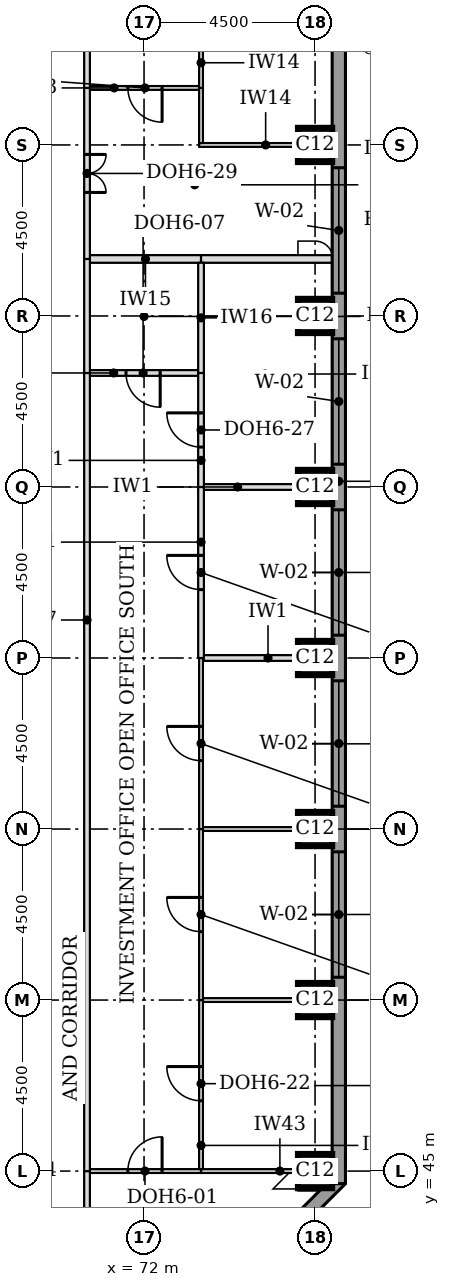
"""IFC4 building model, lengths in metres.
Left out: names, types, materials, properties, quantities, classifications, styles, units other than length and angle.
Written with IfcOpenShell. Run it as: python <this file> out.ifc"""

import sys

from ifc_helpers import new_model, si_unit, direction, frame, frame_2d, origin, origin_2d, place, context, subcontext, project, spatial, rectangle, extrude, element, fill, save


model = new_model("IFC4")
c1 = context("Model", 3, precision=1e-05, world=origin(), true_north=direction((0.0, 1.0)))
c2 = subcontext(c1, "Body", "Model", "MODEL_VIEW")
j1 = project(units=[si_unit("LENGTHUNIT", "METRE"), si_unit("PLANEANGLEUNIT", "RADIAN")], contexts=[c1])
p1 = place(None, origin())
s1 = spatial("IfcSite", under=j1, at=p1, CompositionType="ELEMENT")
p2 = place(p1, origin())
s2 = spatial("IfcBuilding", under=s1, at=p2, CompositionType="ELEMENT")
p3 = place(p2, frame((0.0, 0.0, 188.4)))
s3 = spatial("IfcBuildingStorey", under=s2, at=p3, CompositionType="ELEMENT", Elevation=188.4)
for number, where, z_axis, x_axis in (
    (1, (76.5, 45.0, 0.0), (0.0, 0.0, 1.0), (1.0, 0.0, 0.0)),
    (2, (76.5, 49.5, 0.0), (0.0, 0.0, 1.0), (1.0, 0.0, 0.0)),
    (3, (76.5, 54.0, 0.0), (0.0, 0.0, 1.0), (1.0, 0.0, 0.0)),
    (4, (76.5, 58.5, 0.0), (0.0, 0.0, 1.0), (1.0, 0.0, 0.0)),
    (5, (76.5, 63.0, 0.0), (0.0, 0.0, 1.0), (1.0, 0.0, 0.0)),
    (6, (76.5, 67.5, 0.0), (0.0, 0.0, 1.0), (1.0, 0.0, 0.0)),
    (7, (76.5, 72.0, 0.0), (0.0, 0.0, 1.0), (1.0, 0.0, 0.0)),
):
    element("IfcColumn", number, at=place(p3, frame(where, z_axis=z_axis, x_axis=x_axis)), inside=s3, PredefinedType="COLUMN", context=c2, shape_type="SweptSolid", body=[
        extrude(rectangle(XDim=0.9, YDim=0.9, at=origin_2d()), origin(), (0.0, 0.0, 1.0), 3.7),
    ])
p4 = place(p3, frame((72.208, 39.824, 0.0), z_axis=(0.0, 0.0, 1.0), x_axis=(0.707106781187, 0.707106781187, 0.0)))
e8 = element("IfcWall", 8, at=p4, inside=s3, PredefinedType="STANDARD", context=c2, shape_type="SweptSolid", body=[
    extrude(rectangle(XDim=7.027, YDim=0.35, at=frame_2d((3.513, 0.0))), origin(), (0.0, 0.0, 1.0), 3.525),
])
p5 = place(p4, frame((1.863, 0.0, 0.9)))
e9 = element("IfcOpeningElement", 9, at=p5, cuts=e8, PredefinedType="OPENING", context=c2, shape_type="SweptSolid", body=[
    extrude(rectangle(XDim=3.3, YDim=1.9, at=frame_2d((1.65, 0.95))), frame((0.0, 0.185, 0.0), z_axis=(0.0, -1.0, 0.0), x_axis=(1.0, 0.0, 0.0)), (0.0, 0.0, 1.0), 0.37),
])
p6 = place(p3, frame((77.125, 44.669, 0.0), z_axis=(0.0, 0.0, 1.0), x_axis=(0.0, 1.0, 0.0)))
e10 = element("IfcWall", 10, at=p6, inside=s3, PredefinedType="STANDARD", context=c2, shape_type="SweptSolid", body=[
    extrude(rectangle(XDim=32.163, YDim=0.35, at=frame_2d((16.081, 0.0))), origin(), (0.0, 0.0, 1.0), 3.525),
])
p7 = place(p6, frame((5.431, 0.0, 0.9)))
e11 = element("IfcOpeningElement", 11, at=p7, cuts=e10, PredefinedType="OPENING", context=c2, shape_type="SweptSolid", body=[
    extrude(rectangle(XDim=3.3, YDim=1.9, at=frame_2d((1.65, 0.95))), frame((0.0, 0.185, 0.0), z_axis=(0.0, -1.0, 0.0), x_axis=(1.0, 0.0, 0.0)), (0.0, 0.0, 1.0), 0.37),
])
p8 = place(p6, frame((9.931, 0.0, 0.9)))
e12 = element("IfcOpeningElement", 12, at=p8, cuts=e10, PredefinedType="OPENING", context=c2, shape_type="SweptSolid", body=[
    extrude(rectangle(XDim=3.3, YDim=1.9, at=frame_2d((1.65, 0.95))), frame((0.0, 0.185, 0.0), z_axis=(0.0, -1.0, 0.0), x_axis=(1.0, 0.0, 0.0)), (0.0, 0.0, 1.0), 0.37),
])
p9 = place(p6, frame((14.431, 0.0, 0.9)))
e13 = element("IfcOpeningElement", 13, at=p9, cuts=e10, PredefinedType="OPENING", context=c2, shape_type="SweptSolid", body=[
    extrude(rectangle(XDim=3.3, YDim=1.9, at=frame_2d((1.65, 0.95))), frame((0.0, 0.185, 0.0), z_axis=(0.0, -1.0, 0.0), x_axis=(1.0, 0.0, 0.0)), (0.0, 0.0, 1.0), 0.37),
])
p10 = place(p6, frame((18.931, 0.0, 0.9)))
e14 = element("IfcOpeningElement", 14, at=p10, cuts=e10, PredefinedType="OPENING", context=c2, shape_type="SweptSolid", body=[
    extrude(rectangle(XDim=3.3, YDim=1.9, at=frame_2d((1.65, 0.95))), frame((0.0, 0.185, 0.0), z_axis=(0.0, -1.0, 0.0), x_axis=(1.0, 0.0, 0.0)), (0.0, 0.0, 1.0), 0.37),
])
p11 = place(p6, frame((23.431, 0.0, 0.9)))
e15 = element("IfcOpeningElement", 15, at=p11, cuts=e10, PredefinedType="OPENING", context=c2, shape_type="SweptSolid", body=[
    extrude(rectangle(XDim=3.3, YDim=1.9, at=frame_2d((1.65, 0.95))), frame((0.0, 0.185, 0.0), z_axis=(0.0, -1.0, 0.0), x_axis=(1.0, 0.0, 0.0)), (0.0, 0.0, 1.0), 0.37),
])
p12 = place(p3, frame((70.575, 45.0, 0.0), z_axis=(0.0, 0.0, 1.0), x_axis=(1.0, 0.0, 0.0)))
e16 = element("IfcWall", 16, at=p12, inside=s3, PredefinedType="PARTITIONING", context=c2, shape_type="SweptSolid", body=[
    extrude(rectangle(XDim=2.925, YDim=0.1, at=frame_2d((1.462, 0.0))), origin(), (0.0, 0.0, 1.0), 3.096),
])
p13 = place(p12, frame((1.0, 0.0, 0.0)))
e17 = element("IfcOpeningElement", 17, at=p13, cuts=e16, PredefinedType="OPENING", context=c2, shape_type="SweptSolid", body=[
    extrude(rectangle(XDim=0.9, YDim=2.1, at=frame_2d((0.45, 1.05))), frame((0.0, 0.06, 0.0), z_axis=(0.0, -1.0, 0.0), x_axis=(1.0, 0.0, 0.0)), (0.0, 0.0, 1.0), 0.12),
])
p14 = place(p3, frame((73.5, 45.0, 0.0), z_axis=(0.0, 0.0, 1.0), x_axis=(1.0, 0.0, 0.0)))
e18 = element("IfcWall", 18, at=p14, inside=s3, PredefinedType="PARTITIONING", context=c2, shape_type="SweptSolid", body=[
    extrude(rectangle(XDim=2.55, YDim=0.1, at=frame_2d((1.275, 0.0))), origin(), (0.0, 0.0, 1.0), 3.096),
])
for number, where, z_axis, x_axis in (
    (19, (73.55, 49.5, 0.0), (0.0, 0.0, 1.0), (1.0, 0.0, 0.0)),
    (20, (73.55, 54.0, 0.0), (0.0, 0.0, 1.0), (1.0, 0.0, 0.0)),
):
    element("IfcWall", number, at=place(p3, frame(where, z_axis=z_axis, x_axis=x_axis)), inside=s3, PredefinedType="PARTITIONING", context=c2, shape_type="SweptSolid", body=[
        extrude(rectangle(XDim=3.4, YDim=0.1, at=frame_2d((1.7, 0.0))), origin(), (0.0, 0.0, 1.0), 3.55),
    ])
for number, where, z_axis, x_axis in (
    (21, (73.575, 58.5, 0.0), (0.0, 0.0, 1.0), (1.0, 0.0, 0.0)),
    (22, (73.575, 63.0, 0.0), (0.0, 0.0, 1.0), (1.0, 0.0, 0.0)),
):
    element("IfcWall", number, at=place(p3, frame(where, z_axis=z_axis, x_axis=x_axis)), inside=s3, PredefinedType="PARTITIONING", context=c2, shape_type="SweptSolid", body=[
        extrude(rectangle(XDim=3.375, YDim=0.15, at=frame_2d((1.688, 0.0))), origin(), (0.0, 0.0, 1.0), 3.55),
    ])
p15 = place(p3, frame((70.575, 66.0, 0.0), z_axis=(0.0, 0.0, 1.0), x_axis=(1.0, 0.0, 0.0)))
e23 = element("IfcWall", 23, at=p15, inside=s3, PredefinedType="PARTITIONING", context=c2, shape_type="SweptSolid", body=[
    extrude(rectangle(XDim=2.85, YDim=0.15, at=frame_2d((1.425, 0.0))), origin(), (0.0, 0.0, 1.0), 3.55),
])
p16 = place(p15, frame((0.95, 0.0, 0.0)))
e24 = element("IfcOpeningElement", 24, at=p16, cuts=e23, PredefinedType="OPENING", context=c2, shape_type="SweptSolid", body=[
    extrude(rectangle(XDim=0.9, YDim=2.1, at=frame_2d((0.45, 1.05))), frame((0.0, 0.085, 0.0), z_axis=(0.0, -1.0, 0.0), x_axis=(1.0, 0.0, 0.0)), (0.0, 0.0, 1.0), 0.17),
])
p17 = place(p3, frame((70.575, 69.0, 0.0), z_axis=(0.0, 0.0, 1.0), x_axis=(1.0, 0.0, 0.0)))
e25 = element("IfcWall", 25, at=p17, inside=s3, PredefinedType="PARTITIONING", context=c2, shape_type="SweptSolid", body=[
    extrude(rectangle(XDim=2.925, YDim=0.2, at=frame_2d((1.462, 0.0))), origin(), (0.0, 0.0, 1.0), 3.55),
])
p18 = place(p3, frame((73.5, 69.0, 0.0), z_axis=(0.0, 0.0, 1.0), x_axis=(1.0, 0.0, 0.0)))
e26 = element("IfcWall", 26, at=p18, inside=s3, PredefinedType="PARTITIONING", context=c2, shape_type="SweptSolid", body=[
    extrude(rectangle(XDim=3.45, YDim=0.2, at=frame_2d((1.725, 0.0))), origin(), (0.0, 0.0, 1.0), 3.55),
])
p19 = place(p3, frame((73.45, 72.0, 0.0), z_axis=(0.0, 0.0, 1.0), x_axis=(1.0, 0.0, 0.0)))
e27 = element("IfcWall", 27, at=p19, inside=s3, PredefinedType="PARTITIONING", context=c2, shape_type="SweptSolid", body=[
    extrude(rectangle(XDim=3.5, YDim=0.1, at=frame_2d((1.75, 0.0))), origin(), (0.0, 0.0, 1.0), 3.55),
])
p20 = place(p3, frame((70.575, 73.5, 0.0), z_axis=(0.0, 0.0, 1.0), x_axis=(1.0, 0.0, 0.0)))
e28 = element("IfcWall", 28, at=p20, inside=s3, PredefinedType="PARTITIONING", context=c2, shape_type="SweptSolid", body=[
    extrude(rectangle(XDim=2.875, YDim=0.1, at=frame_2d((1.438, 0.0))), origin(), (0.0, 0.0, 1.0), 3.096),
])
p21 = place(p20, frame((1.0, 0.0, 0.0)))
e29 = element("IfcOpeningElement", 29, at=p21, cuts=e28, PredefinedType="OPENING", context=c2, shape_type="SweptSolid", body=[
    extrude(rectangle(XDim=0.9, YDim=2.1, at=frame_2d((0.45, 1.05))), frame((0.0, 0.06, 0.0), z_axis=(0.0, -1.0, 0.0), x_axis=(1.0, 0.0, 0.0)), (0.0, 0.0, 1.0), 0.12),
])
p22 = place(p3, frame((70.5, 40.05, 0.0), z_axis=(0.0, 0.0, 1.0), x_axis=(0.0, 1.0, 0.0)))
e30 = element("IfcWall", 30, at=p22, inside=s3, PredefinedType="PARTITIONING", context=c2, shape_type="SweptSolid", body=[
    extrude(rectangle(XDim=4.95, YDim=0.15, at=frame_2d((2.475, 0.0))), origin(), (0.0, 0.0, 1.0), 3.55),
])
p23 = place(p22, frame((2.0, 0.0, 0.0)))
e31 = element("IfcOpeningElement", 31, at=p23, cuts=e30, PredefinedType="OPENING", context=c2, shape_type="SweptSolid", body=[
    extrude(rectangle(XDim=1.0, YDim=2.1, at=frame_2d((0.5, 1.05))), frame((0.0, 0.085, 0.0), z_axis=(0.0, -1.0, 0.0), x_axis=(1.0, 0.0, 0.0)), (0.0, 0.0, 1.0), 0.17),
])
p24 = place(p3, frame((70.5, 45.0, 0.0), z_axis=(0.0, 0.0, 1.0), x_axis=(0.0, 1.0, 0.0)))
e32 = element("IfcWall", 32, at=p24, inside=s3, PredefinedType="PARTITIONING", context=c2, shape_type="SweptSolid", body=[
    extrude(rectangle(XDim=21.0, YDim=0.15, at=frame_2d((10.5, 0.0))), origin(), (0.0, 0.0, 1.0), 3.55),
])
p25 = place(p3, frame((73.5, 45.05, 0.0), z_axis=(0.0, 0.0, 1.0), x_axis=(0.0, 1.0, 0.0)))
e33 = element("IfcWall", 33, at=p25, inside=s3, PredefinedType="PARTITIONING", context=c2, shape_type="SweptSolid", body=[
    extrude(rectangle(XDim=4.45, YDim=0.1, at=frame_2d((2.225, 0.0))), origin(), (0.0, 0.0, 1.0), 3.55),
])
p26 = place(p25, frame((1.8, 0.0, 0.0)))
e34 = element("IfcOpeningElement", 34, at=p26, cuts=e33, PredefinedType="OPENING", context=c2, shape_type="SweptSolid", body=[
    extrude(rectangle(XDim=0.9, YDim=2.1, at=frame_2d((0.45, 1.05))), frame((0.0, 0.06, 0.0), z_axis=(0.0, -1.0, 0.0), x_axis=(1.0, 0.0, 0.0)), (0.0, 0.0, 1.0), 0.12),
])
p27 = place(p3, frame((73.5, 49.5, 0.0), z_axis=(0.0, 0.0, 1.0), x_axis=(0.0, 1.0, 0.0)))
e35 = element("IfcWall", 35, at=p27, inside=s3, PredefinedType="PARTITIONING", context=c2, shape_type="SweptSolid", body=[
    extrude(rectangle(XDim=4.5, YDim=0.1, at=frame_2d((2.25, 0.0))), origin(), (0.0, 0.0, 1.0), 3.55),
])
p28 = place(p27, frame((1.8, 0.0, 0.0)))
e36 = element("IfcOpeningElement", 36, at=p28, cuts=e35, PredefinedType="OPENING", context=c2, shape_type="SweptSolid", body=[
    extrude(rectangle(XDim=0.9, YDim=2.1, at=frame_2d((0.45, 1.05))), frame((0.0, 0.06, 0.0), z_axis=(0.0, -1.0, 0.0), x_axis=(1.0, 0.0, 0.0)), (0.0, 0.0, 1.0), 0.12),
])
p29 = place(p3, frame((73.5, 54.0, 0.0), z_axis=(0.0, 0.0, 1.0), x_axis=(0.0, 1.0, 0.0)))
e37 = element("IfcWall", 37, at=p29, inside=s3, PredefinedType="PARTITIONING", context=c2, shape_type="SweptSolid", body=[
    extrude(rectangle(XDim=4.5, YDim=0.1, at=frame_2d((2.25, 0.0))), origin(), (0.0, 0.0, 1.0), 3.55),
])
p30 = place(p29, frame((1.8, 0.0, 0.0)))
e38 = element("IfcOpeningElement", 38, at=p30, cuts=e37, PredefinedType="OPENING", context=c2, shape_type="SweptSolid", body=[
    extrude(rectangle(XDim=0.9, YDim=2.1, at=frame_2d((0.45, 1.05))), frame((0.0, 0.06, 0.0), z_axis=(0.0, -1.0, 0.0), x_axis=(1.0, 0.0, 0.0)), (0.0, 0.0, 1.0), 0.12),
])
p31 = place(p3, frame((73.5, 58.5, 0.0), z_axis=(0.0, 0.0, 1.0), x_axis=(0.0, 1.0, 0.0)))
e39 = element("IfcWall", 39, at=p31, inside=s3, PredefinedType="PARTITIONING", context=c2, shape_type="SweptSolid", body=[
    extrude(rectangle(XDim=4.5, YDim=0.15, at=frame_2d((2.25, 0.0))), origin(), (0.0, 0.0, 1.0), 3.55),
])
p32 = place(p31, frame((1.8, 0.0, 0.0)))
e40 = element("IfcOpeningElement", 40, at=p32, cuts=e39, PredefinedType="OPENING", context=c2, shape_type="SweptSolid", body=[
    extrude(rectangle(XDim=0.9, YDim=2.1, at=frame_2d((0.45, 1.05))), frame((0.0, 0.085, 0.0), z_axis=(0.0, -1.0, 0.0), x_axis=(1.0, 0.0, 0.0)), (0.0, 0.0, 1.0), 0.17),
])
p33 = place(p3, frame((73.5, 63.0, 0.0), z_axis=(0.0, 0.0, 1.0), x_axis=(0.0, 1.0, 0.0)))
e41 = element("IfcWall", 41, at=p33, inside=s3, PredefinedType="PARTITIONING", context=c2, shape_type="SweptSolid", body=[
    extrude(rectangle(XDim=3.0, YDim=0.15, at=frame_2d((1.5, 0.0))), origin(), (0.0, 0.0, 1.0), 3.55),
])
p34 = place(p33, frame((1.05, 0.0, 0.0)))
e42 = element("IfcOpeningElement", 42, at=p34, cuts=e41, PredefinedType="OPENING", context=c2, shape_type="SweptSolid", body=[
    extrude(rectangle(XDim=0.9, YDim=2.1, at=frame_2d((0.45, 1.05))), frame((0.0, 0.085, 0.0), z_axis=(0.0, -1.0, 0.0), x_axis=(1.0, 0.0, 0.0)), (0.0, 0.0, 1.0), 0.17),
])
p35 = place(p3, frame((70.5, 66.0, 0.0), z_axis=(0.0, 0.0, 1.0), x_axis=(0.0, 1.0, 0.0)))
e43 = element("IfcWall", 43, at=p35, inside=s3, PredefinedType="PARTITIONING", context=c2, shape_type="SweptSolid", body=[
    extrude(rectangle(XDim=3.0, YDim=0.15, at=frame_2d((1.5, 0.0))), origin(), (0.0, 0.0, 1.0), 3.55),
])
p36 = place(p3, frame((73.5, 66.0, 0.0), z_axis=(0.0, 0.0, 1.0), x_axis=(0.0, 1.0, 0.0)))
e44 = element("IfcWall", 44, at=p36, inside=s3, PredefinedType="PARTITIONING", context=c2, shape_type="SweptSolid", body=[
    extrude(rectangle(XDim=2.9, YDim=0.15, at=frame_2d((1.45, 0.0))), origin(), (0.0, 0.0, 1.0), 3.55),
])
p37 = place(p3, frame((70.5, 69.0, 0.0), z_axis=(0.0, 0.0, 1.0), x_axis=(0.0, 1.0, 0.0)))
e45 = element("IfcWall", 45, at=p37, inside=s3, PredefinedType="PARTITIONING", context=c2, shape_type="SweptSolid", body=[
    extrude(rectangle(XDim=4.5, YDim=0.15, at=frame_2d((2.25, 0.0))), origin(), (0.0, 0.0, 1.0), 3.55),
])
p38 = place(p37, frame((1.75, 0.0, 0.0)))
e46 = element("IfcOpeningElement", 46, at=p38, cuts=e45, PredefinedType="OPENING", context=c2, shape_type="SweptSolid", body=[
    extrude(rectangle(XDim=1.0, YDim=2.1, at=frame_2d((0.5, 1.05))), frame((0.0, 0.085, 0.0), z_axis=(0.0, -1.0, 0.0), x_axis=(1.0, 0.0, 0.0)), (0.0, 0.0, 1.0), 0.17),
])
p39 = place(p3, frame((73.5, 72.05, 0.0), z_axis=(0.0, 0.0, 1.0), x_axis=(0.0, 1.0, 0.0)))
e47 = element("IfcWall", 47, at=p39, inside=s3, PredefinedType="PARTITIONING", context=c2, shape_type="SweptSolid", body=[
    extrude(rectangle(XDim=1.45, YDim=0.1, at=frame_2d((0.725, 0.0))), origin(), (0.0, 0.0, 1.0), 3.55),
])
p40 = place(p3, frame((70.5, 73.5, 0.0), z_axis=(0.0, 0.0, 1.0), x_axis=(0.0, 1.0, 0.0)))
e48 = element("IfcWall", 48, at=p40, inside=s3, PredefinedType="PARTITIONING", context=c2, shape_type="SweptSolid", body=[
    extrude(rectangle(XDim=3.0, YDim=0.15, at=frame_2d((1.5, 0.0))), origin(), (0.0, 0.0, 1.0), 3.55),
])
p41 = place(p3, frame((73.5, 73.5, 0.0), z_axis=(0.0, 0.0, 1.0), x_axis=(0.0, 1.0, 0.0)))
e49 = element("IfcWall", 49, at=p41, inside=s3, PredefinedType="PARTITIONING", context=c2, shape_type="SweptSolid", body=[
    extrude(rectangle(XDim=2.925, YDim=0.1, at=frame_2d((1.462, 0.0))), origin(), (0.0, 0.0, 1.0), 3.55),
])
p42 = place(p41, frame((1.0, 0.0, 0.0)))
e50 = element("IfcOpeningElement", 50, at=p42, cuts=e49, PredefinedType="OPENING", context=c2, shape_type="SweptSolid", body=[
    extrude(rectangle(XDim=0.9, YDim=2.1, at=frame_2d((0.45, 1.05))), frame((0.0, 0.06, 0.0), z_axis=(0.0, -1.0, 0.0), x_axis=(1.0, 0.0, 0.0)), (0.0, 0.0, 1.0), 0.12),
])
p43 = place(p7, origin())
e51 = element("IfcWindow", 51, at=p43, inside=s3, PartitioningType="SINGLE_PANEL", PredefinedType="WINDOW", context=c2, shape_type="SweptSolid", body=[
    extrude(rectangle(XDim=3.3, YDim=1.9, at=frame_2d((1.65, 0.95))), frame((0.0, 0.085, 0.0), z_axis=(0.0, -1.0, 0.0), x_axis=(1.0, 0.0, 0.0)), (0.0, 0.0, 1.0), 0.06),
])
fill(e11, e51)
p44 = place(p8, origin())
e52 = element("IfcWindow", 52, at=p44, inside=s3, PartitioningType="SINGLE_PANEL", PredefinedType="WINDOW", context=c2, shape_type="SweptSolid", body=[
    extrude(rectangle(XDim=3.3, YDim=1.9, at=frame_2d((1.65, 0.95))), frame((0.0, 0.085, 0.0), z_axis=(0.0, -1.0, 0.0), x_axis=(1.0, 0.0, 0.0)), (0.0, 0.0, 1.0), 0.06),
])
fill(e12, e52)
p45 = place(p9, origin())
e53 = element("IfcWindow", 53, at=p45, inside=s3, PartitioningType="SINGLE_PANEL", PredefinedType="WINDOW", context=c2, shape_type="SweptSolid", body=[
    extrude(rectangle(XDim=3.3, YDim=1.9, at=frame_2d((1.65, 0.95))), frame((0.0, 0.085, 0.0), z_axis=(0.0, -1.0, 0.0), x_axis=(1.0, 0.0, 0.0)), (0.0, 0.0, 1.0), 0.06),
])
fill(e13, e53)
p46 = place(p10, origin())
e54 = element("IfcWindow", 54, at=p46, inside=s3, PartitioningType="SINGLE_PANEL", PredefinedType="WINDOW", context=c2, shape_type="SweptSolid", body=[
    extrude(rectangle(XDim=3.3, YDim=1.9, at=frame_2d((1.65, 0.95))), frame((0.0, 0.085, 0.0), z_axis=(0.0, -1.0, 0.0), x_axis=(1.0, 0.0, 0.0)), (0.0, 0.0, 1.0), 0.06),
])
fill(e14, e54)
p47 = place(p11, origin())
e55 = element("IfcWindow", 55, at=p47, inside=s3, PartitioningType="SINGLE_PANEL", PredefinedType="WINDOW", context=c2, shape_type="SweptSolid", body=[
    extrude(rectangle(XDim=3.3, YDim=1.9, at=frame_2d((1.65, 0.95))), frame((0.0, 0.085, 0.0), z_axis=(0.0, -1.0, 0.0), x_axis=(1.0, 0.0, 0.0)), (0.0, 0.0, 1.0), 0.06),
])
fill(e15, e55)
p48 = place(p13, origin())
e56 = element("IfcDoor", 56, at=p48, inside=s3, OperationType="SINGLE_SWING_RIGHT", PredefinedType="DOOR", context=c2, shape_type="SweptSolid", body=[
    extrude(rectangle(XDim=0.9, YDim=2.1, at=frame_2d((0.45, 1.05))), frame((0.0, 0.025, 0.0), z_axis=(0.0, -1.0, 0.0), x_axis=(1.0, 0.0, 0.0)), (0.0, 0.0, 1.0), 0.05),
])
fill(e17, e56)
p49 = place(p26, origin())
e57 = element("IfcDoor", 57, at=p49, inside=s3, OperationType="SINGLE_SWING_RIGHT", PredefinedType="DOOR", context=c2, shape_type="SweptSolid", body=[
    extrude(rectangle(XDim=0.9, YDim=2.1, at=frame_2d((0.45, 1.05))), frame((0.0, 0.025, 0.0), z_axis=(0.0, -1.0, 0.0), x_axis=(1.0, 0.0, 0.0)), (0.0, 0.0, 1.0), 0.05),
])
fill(e34, e57)
p50 = place(p28, origin())
e58 = element("IfcDoor", 58, at=p50, inside=s3, OperationType="SINGLE_SWING_RIGHT", PredefinedType="DOOR", context=c2, shape_type="SweptSolid", body=[
    extrude(rectangle(XDim=0.9, YDim=2.1, at=frame_2d((0.45, 1.05))), frame((0.0, 0.025, 0.0), z_axis=(0.0, -1.0, 0.0), x_axis=(1.0, 0.0, 0.0)), (0.0, 0.0, 1.0), 0.05),
])
fill(e36, e58)
p51 = place(p30, origin())
e59 = element("IfcDoor", 59, at=p51, inside=s3, OperationType="SINGLE_SWING_RIGHT", PredefinedType="DOOR", context=c2, shape_type="SweptSolid", body=[
    extrude(rectangle(XDim=0.9, YDim=2.1, at=frame_2d((0.45, 1.05))), frame((0.0, 0.025, 0.0), z_axis=(0.0, -1.0, 0.0), x_axis=(1.0, 0.0, 0.0)), (0.0, 0.0, 1.0), 0.05),
])
fill(e38, e59)
p52 = place(p16, frame((0.9, 0.0, 0.0), z_axis=(0.0, 0.0, 1.0), x_axis=(-1.0, 0.0, 0.0)))
e60 = element("IfcDoor", 60, at=p52, inside=s3, OperationType="SINGLE_SWING_LEFT", PredefinedType="DOOR", context=c2, shape_type="SweptSolid", body=[
    extrude(rectangle(XDim=0.9, YDim=2.1, at=frame_2d((0.45, 1.05))), frame((0.0, 0.025, 0.0), z_axis=(0.0, -1.0, 0.0), x_axis=(1.0, 0.0, 0.0)), (0.0, 0.0, 1.0), 0.05),
])
fill(e24, e60)
p53 = place(p32, origin())
e61 = element("IfcDoor", 61, at=p53, inside=s3, OperationType="SINGLE_SWING_RIGHT", PredefinedType="DOOR", context=c2, shape_type="SweptSolid", body=[
    extrude(rectangle(XDim=0.9, YDim=2.1, at=frame_2d((0.45, 1.05))), frame((0.0, 0.025, 0.0), z_axis=(0.0, -1.0, 0.0), x_axis=(1.0, 0.0, 0.0)), (0.0, 0.0, 1.0), 0.05),
])
fill(e40, e61)
p54 = place(p34, origin())
e62 = element("IfcDoor", 62, at=p54, inside=s3, OperationType="SINGLE_SWING_RIGHT", PredefinedType="DOOR", context=c2, shape_type="SweptSolid", body=[
    extrude(rectangle(XDim=0.9, YDim=2.1, at=frame_2d((0.45, 1.05))), frame((0.0, 0.025, 0.0), z_axis=(0.0, -1.0, 0.0), x_axis=(1.0, 0.0, 0.0)), (0.0, 0.0, 1.0), 0.05),
])
fill(e42, e62)
p55 = place(p38, frame((1.0, 0.0, 0.0), z_axis=(0.0, 0.0, 1.0), x_axis=(-1.0, 0.0, 0.0)))
e63 = element("IfcDoor", 63, at=p55, inside=s3, OperationType="DOUBLE_DOOR_SINGLE_SWING", PredefinedType="DOOR", context=c2, shape_type="SweptSolid", body=[
    extrude(rectangle(XDim=1.0, YDim=2.1, at=frame_2d((0.5, 1.05))), frame((0.0, 0.025, 0.0), z_axis=(0.0, -1.0, 0.0), x_axis=(1.0, 0.0, 0.0)), (0.0, 0.0, 1.0), 0.05),
])
fill(e46, e63)
p56 = place(p21, frame((0.9, 0.0, 0.0), z_axis=(0.0, 0.0, 1.0), x_axis=(-1.0, 0.0, 0.0)))
e64 = element("IfcDoor", 64, at=p56, inside=s3, OperationType="SINGLE_SWING_LEFT", PredefinedType="DOOR", context=c2, shape_type="SweptSolid", body=[
    extrude(rectangle(XDim=0.9, YDim=2.1, at=frame_2d((0.45, 1.05))), frame((0.0, 0.025, 0.0), z_axis=(0.0, -1.0, 0.0), x_axis=(1.0, 0.0, 0.0)), (0.0, 0.0, 1.0), 0.05),
])
fill(e29, e64)
save(model, sys.argv[1])
